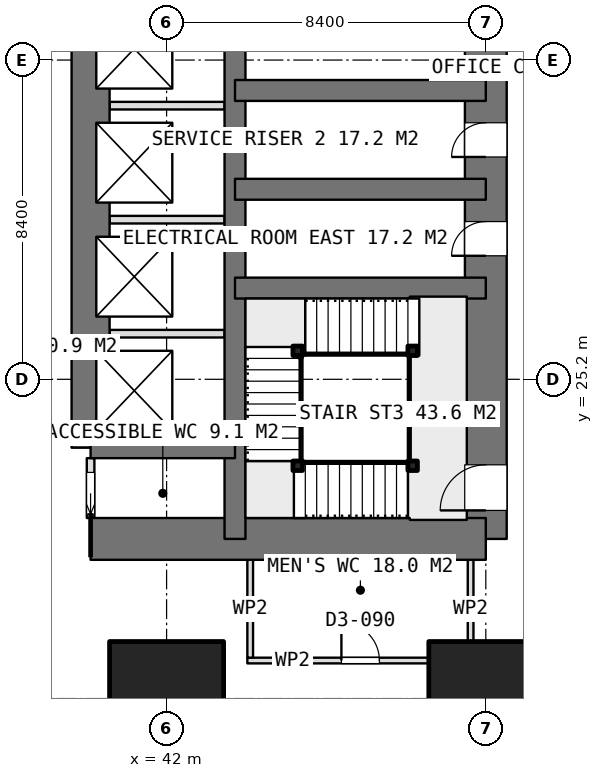
"""IFC4 building model, lengths in metres.
Left out: names, types, materials, properties, quantities, classifications, styles, units other than length and angle.
Written with IfcOpenShell. Run it as: python <this file> out.ifc"""

import sys

from ifc_helpers import new_model, si_unit, direction, frame, frame_2d, origin, origin_2d, place, context, subcontext, project, spatial, rectangle, extrude, element, fill, save


model = new_model("IFC4")
c1 = context("Model", 3, precision=1e-05, world=origin(), true_north=direction((0.0, 1.0)))
c2 = subcontext(c1, "Body", "Model", "MODEL_VIEW")
j1 = project(units=[si_unit("LENGTHUNIT", "METRE"), si_unit("PLANEANGLEUNIT", "RADIAN")], contexts=[c1])
p1 = place(None, origin())
s1 = spatial("IfcSite", under=j1, at=p1, CompositionType="ELEMENT")
p2 = place(p1, origin())
s2 = spatial("IfcBuilding", under=s1, at=p2, CompositionType="ELEMENT")
p3 = place(p2, frame((0.0, 0.0, 81.65)))
s3 = spatial("IfcBuildingStorey", under=s2, at=p3, CompositionType="ELEMENT", Elevation=81.65)
p4 = place(p3, frame((40.0, 21.0, 0.0), z_axis=(0.0, 0.0, 1.0), x_axis=(1.0, 0.0, 0.0)))
e1 = element("IfcWall", 1, at=p4, inside=s3, PredefinedType="SHEAR", context=c2, shape_type="SweptSolid", body=[
    extrude(rectangle(XDim=10.4, YDim=1.1, at=frame_2d((5.2, 0.0))), origin(), (0.0, 0.0, 1.0), 3.75),
])
p5 = place(p3, frame((50.4, 21.0, 0.0), z_axis=(0.0, 0.0, 1.0), x_axis=(0.0, 1.0, 0.0)))
e2 = element("IfcWall", 2, at=p5, inside=s3, PredefinedType="SHEAR", context=c2, shape_type="SweptSolid", body=[
    extrude(rectangle(XDim=25.2, YDim=1.1, at=frame_2d((12.6, 0.0))), origin(), (0.0, 0.0, 1.0), 3.75),
])
p6 = place(p5, frame((16.2, 0.0, 0.0)))
e3 = element("IfcOpeningElement", 3, at=p6, cuts=e2, PredefinedType="OPENING", context=c2, shape_type="SweptSolid", body=[
    extrude(rectangle(XDim=1.2, YDim=2.1, at=frame_2d((0.6, 1.05))), frame((0.0, 0.56, 0.0), z_axis=(0.0, -1.0, 0.0), x_axis=(1.0, 0.0, 0.0)), (0.0, 0.0, 1.0), 1.12),
])
p7 = place(p5, frame((10.05, 0.0, 0.0)))
e4 = element("IfcOpeningElement", 4, at=p7, cuts=e2, PredefinedType="OPENING", context=c2, shape_type="SweptSolid", body=[
    extrude(rectangle(XDim=0.9, YDim=2.1, at=frame_2d((0.45, 1.05))), frame((0.0, 0.56, 0.0), z_axis=(0.0, -1.0, 0.0), x_axis=(1.0, 0.0, 0.0)), (0.0, 0.0, 1.0), 1.12),
])
p8 = place(p5, frame((7.45, 0.0, 0.0)))
e5 = element("IfcOpeningElement", 5, at=p8, cuts=e2, PredefinedType="OPENING", context=c2, shape_type="SweptSolid", body=[
    extrude(rectangle(XDim=0.9, YDim=2.1, at=frame_2d((0.45, 1.05))), frame((0.0, 0.56, 0.0), z_axis=(0.0, -1.0, 0.0), x_axis=(1.0, 0.0, 0.0)), (0.0, 0.0, 1.0), 1.12),
])
p9 = place(p5, frame((0.75, 0.0, 0.0)))
e6 = element("IfcOpeningElement", 6, at=p9, cuts=e2, PredefinedType="OPENING", context=c2, shape_type="SweptSolid", body=[
    extrude(rectangle(XDim=1.2, YDim=2.1, at=frame_2d((0.6, 1.05))), frame((0.0, 0.56, 0.0), z_axis=(0.0, -1.0, 0.0), x_axis=(1.0, 0.0, 0.0)), (0.0, 0.0, 1.0), 1.12),
])
p10 = place(p3, frame((43.8, 21.0, 0.0), z_axis=(0.0, 0.0, 1.0), x_axis=(0.0, 1.0, 0.0)))
e7 = element("IfcWall", 7, at=p10, inside=s3, PredefinedType="SHEAR", context=c2, shape_type="SweptSolid", body=[
    extrude(rectangle(XDim=25.2, YDim=0.55, at=frame_2d((12.6, 0.0))), origin(), (0.0, 0.0, 1.0), 3.75),
])
p11 = place(p3, frame((40.0, 23.4, 0.0), z_axis=(0.0, 0.0, 1.0), x_axis=(0.0, 1.0, 0.0)))
e8 = element("IfcWall", 8, at=p11, inside=s3, PredefinedType="SHEAR", context=c2, shape_type="SweptSolid", body=[
    extrude(rectangle(XDim=18.0, YDim=1.0, at=frame_2d((9.0, 0.0))), origin(), (0.0, 0.0, 1.0), 3.75),
])
p12 = place(p3, frame((40.0, 23.4, 0.0), z_axis=(0.0, 0.0, 1.0), x_axis=(1.0, 0.0, 0.0)))
e9 = element("IfcWall", 9, at=p12, inside=s3, PredefinedType="SHEAR", context=c2, shape_type="SweptSolid", body=[
    extrude(rectangle(XDim=3.8, YDim=0.55, at=frame_2d((1.9, 0.0))), origin(), (0.0, 0.0, 1.0), 3.75),
])
for number, where, z_axis, x_axis in (
    (10, (43.8, 27.6, 0.0), (0.0, 0.0, 1.0), (1.0, 0.0, 0.0)),
    (11, (43.8, 30.2, 0.0), (0.0, 0.0, 1.0), (1.0, 0.0, 0.0)),
    (12, (43.8, 32.8, 0.0), (0.0, 0.0, 1.0), (1.0, 0.0, 0.0)),
):
    element("IfcWall", number, at=place(p3, frame(where, z_axis=z_axis, x_axis=x_axis)), inside=s3, PredefinedType="SHEAR", context=c2, shape_type="SweptSolid", body=[
        extrude(rectangle(XDim=6.6, YDim=0.55, at=frame_2d((3.3, 0.0))), origin(), (0.0, 0.0, 1.0), 3.75),
    ])
for number, where, z_axis, x_axis in (
    (13, (42.0, 16.8, 0.0), (0.0, 0.0, 1.0), (1.0, 0.0, 0.0)),
    (14, (50.4, 16.8, 0.0), (0.0, 0.0, 1.0), (1.0, 0.0, 0.0)),
):
    element("IfcColumn", number, at=place(p3, frame(where, z_axis=z_axis, x_axis=x_axis)), inside=s3, PredefinedType="COLUMN", context=c2, shape_type="SweptSolid", body=[
        extrude(rectangle(XDim=3.0, YDim=3.0, at=origin_2d()), origin(), (0.0, 0.0, 1.0), 3.75),
    ])
for number, where, z_axis, x_axis in (
    (15, (40.5, 26.4, 0.0), (0.0, 0.0, 1.0), (1.0, 0.0, 0.0)),
    (16, (40.5, 29.4, 0.0), (0.0, 0.0, 1.0), (1.0, 0.0, 0.0)),
    (17, (40.5, 32.4, 0.0), (0.0, 0.0, 1.0), (1.0, 0.0, 0.0)),
):
    element("IfcWall", number, at=place(p3, frame(where, z_axis=z_axis, x_axis=x_axis)), inside=s3, PredefinedType="PARTITIONING", context=c2, shape_type="SweptSolid", body=[
        extrude(rectangle(XDim=3.025, YDim=0.2, at=frame_2d((1.512, 0.0))), origin(), (0.0, 0.0, 1.0), 3.4),
    ])
p13 = place(p3, frame((40.0, 21.55, 0.0), z_axis=(0.0, 0.0, 1.0), x_axis=(0.0, 1.0, 0.0)))
e18 = element("IfcWall", 18, at=p13, inside=s3, PredefinedType="PARTITIONING", context=c2, shape_type="SweptSolid", body=[
    extrude(rectangle(XDim=1.575, YDim=0.2, at=frame_2d((0.788, 0.0))), origin(), (0.0, 0.0, 1.0), 3.4),
])
p14 = place(p13, frame((0.1, 0.0, 0.0)))
e19 = element("IfcOpeningElement", 19, at=p14, cuts=e18, PredefinedType="OPENING", context=c2, shape_type="SweptSolid", body=[
    extrude(rectangle(XDim=1.1, YDim=2.1, at=frame_2d((0.55, 1.05))), frame((0.0, 0.11, 0.0), z_axis=(0.0, -1.0, 0.0), x_axis=(1.0, 0.0, 0.0)), (0.0, 0.0, 1.0), 0.22),
])
p15 = place(p3, frame((44.125, 17.8, 0.0), z_axis=(0.0, 0.0, 1.0), x_axis=(1.0, 0.0, 0.0)))
e20 = element("IfcWall", 20, at=p15, inside=s3, PredefinedType="PARTITIONING", context=c2, shape_type="SweptSolid", body=[
    extrude(rectangle(XDim=5.95, YDim=0.15, at=frame_2d((2.975, 0.0))), origin(), (0.0, 0.0, 1.0), 3.4),
])
p16 = place(p15, frame((2.475, 0.0, 0.0)))
e21 = element("IfcOpeningElement", 21, at=p16, cuts=e20, PredefinedType="OPENING", context=c2, shape_type="SweptSolid", body=[
    extrude(rectangle(XDim=1.0, YDim=2.1, at=frame_2d((0.5, 1.05))), frame((0.0, 0.085, 0.0), z_axis=(0.0, -1.0, 0.0), x_axis=(1.0, 0.0, 0.0)), (0.0, 0.0, 1.0), 0.17),
])
for number, where, z_axis, x_axis in (
    (22, (44.2, 17.875, 0.0), (0.0, 0.0, 1.0), (0.0, 1.0, 0.0)),
    (23, (50.0, 17.875, 0.0), (0.0, 0.0, 1.0), (0.0, 1.0, 0.0)),
):
    element("IfcWall", number, at=place(p3, frame(where, z_axis=z_axis, x_axis=x_axis)), inside=s3, PredefinedType="PARTITIONING", context=c2, shape_type="SweptSolid", body=[
        extrude(rectangle(XDim=2.575, YDim=0.15, at=frame_2d((1.288, 0.0))), origin(), (0.0, 0.0, 1.0), 3.4),
    ])
for number, where, z_axis, x_axis in (
    (24, (48.475, 22.925, 0.0), (0.0, 0.0, 1.0), (1.0, 0.0, 0.0)),
    (25, (45.45, 22.925, 0.0), (0.0, 0.0, 1.0), (1.0, 0.0, 0.0)),
    (26, (45.45, 25.95, 0.0), (0.0, 0.0, 1.0), (1.0, 0.0, 0.0)),
    (27, (48.475, 25.95, 0.0), (0.0, 0.0, 1.0), (1.0, 0.0, 0.0)),
):
    element("IfcColumn", number, at=place(p3, frame(where, z_axis=z_axis, x_axis=x_axis)), inside=s3, PredefinedType="COLUMN", context=c2, shape_type="SweptSolid", body=[
        extrude(rectangle(XDim=0.25, YDim=0.25, at=origin_2d()), origin(), (0.0, 0.0, 1.0), 3.75),
    ])
p17 = place(p7, origin())
e28 = element("IfcDoor", 28, at=p17, inside=s3, OperationType="SINGLE_SWING_LEFT", PredefinedType="DOOR", context=c2, shape_type="SweptSolid", body=[
    extrude(rectangle(XDim=0.9, YDim=2.1, at=frame_2d((0.45, 1.05))), frame((0.0, 0.025, 0.0), z_axis=(0.0, -1.0, 0.0), x_axis=(1.0, 0.0, 0.0)), (0.0, 0.0, 1.0), 0.05),
])
fill(e4, e28)
p18 = place(p8, origin())
e29 = element("IfcDoor", 29, at=p18, inside=s3, OperationType="SINGLE_SWING_LEFT", PredefinedType="DOOR", context=c2, shape_type="SweptSolid", body=[
    extrude(rectangle(XDim=0.9, YDim=2.1, at=frame_2d((0.45, 1.05))), frame((0.0, 0.025, 0.0), z_axis=(0.0, -1.0, 0.0), x_axis=(1.0, 0.0, 0.0)), (0.0, 0.0, 1.0), 0.05),
])
fill(e5, e29)
p19 = place(p14, origin())
e30 = element("IfcDoor", 30, at=p19, inside=s3, OperationType="SLIDING_TO_LEFT", PredefinedType="DOOR", context=c2, shape_type="SweptSolid", body=[
    extrude(rectangle(XDim=1.1, YDim=2.1, at=frame_2d((0.55, 1.05))), frame((0.0, 0.025, 0.0), z_axis=(0.0, -1.0, 0.0), x_axis=(1.0, 0.0, 0.0)), (0.0, 0.0, 1.0), 0.05),
])
fill(e19, e30)
p20 = place(p16, origin())
e31 = element("IfcDoor", 31, at=p20, inside=s3, OperationType="SINGLE_SWING_LEFT", PredefinedType="DOOR", context=c2, shape_type="SweptSolid", body=[
    extrude(rectangle(XDim=1.0, YDim=2.1, at=frame_2d((0.5, 1.05))), frame((0.0, 0.025, 0.0), z_axis=(0.0, -1.0, 0.0), x_axis=(1.0, 0.0, 0.0)), (0.0, 0.0, 1.0), 0.05),
])
fill(e21, e31)
p21 = place(p9, origin())
e32 = element("IfcDoor", 32, at=p21, inside=s3, OperationType="SINGLE_SWING_RIGHT", PredefinedType="DOOR", context=c2, shape_type="SweptSolid", body=[
    extrude(rectangle(XDim=1.2, YDim=2.1, at=frame_2d((0.6, 1.05))), frame((0.0, 0.025, 0.0), z_axis=(0.0, -1.0, 0.0), x_axis=(1.0, 0.0, 0.0)), (0.0, 0.0, 1.0), 0.05),
])
fill(e6, e32)
save(model, sys.argv[1])
